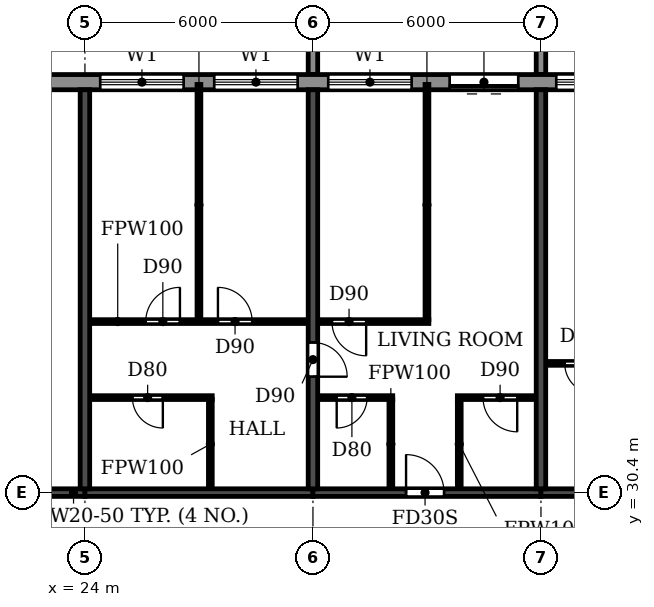
"""IFC4 building model, lengths in metres.
Left out: names, types, materials, properties, quantities, classifications, styles, units other than length and angle.
Written with IfcOpenShell. Run it as: python <this file> out.ifc"""

import sys

from ifc_helpers import new_model, si_unit, direction, frame, frame_2d, origin, place, context, subcontext, project, spatial, polyline, rectangle, outline, extrude, source, transform, mapped, element, fill, save


model = new_model("IFC4")
c1 = context("Model", 3, precision=1e-05, world=origin(), true_north=direction((0.0, 1.0)))
c2 = subcontext(c1, "Body", "Model", "MODEL_VIEW")
j1 = project(units=[si_unit("LENGTHUNIT", "METRE"), si_unit("PLANEANGLEUNIT", "RADIAN")], contexts=[c1])
p1 = place(None, origin())
s1 = spatial("IfcSite", under=j1, at=p1, CompositionType="ELEMENT")
p2 = place(p1, origin())
s2 = spatial("IfcBuilding", under=s1, at=p2, CompositionType="ELEMENT")
p3 = place(p2, frame((0.0, 0.0, 251.1)))
s3 = spatial("IfcBuildingStorey", under=s2, at=p3, CompositionType="ELEMENT", Elevation=251.1)
p4 = place(p3, frame((24.0, 30.5, 0.0), z_axis=(0.0, 0.0, 1.0), x_axis=(0.0, 1.0, 0.0)))
e1 = element("IfcWall", 1, at=p4, inside=s3, PredefinedType="SHEAR", context=c2, shape_type="SweptSolid", body=[
    extrude(rectangle(XDim=10.5, YDim=0.25, at=frame_2d((5.25, 0.0))), origin(), (0.0, 0.0, 1.0), 3.08),
])
p5 = place(p3, frame((30.0, 30.5, 0.0), z_axis=(0.0, 0.0, 1.0), x_axis=(0.0, 1.0, 0.0)))
e2 = element("IfcWall", 2, at=p5, inside=s3, PredefinedType="SHEAR", context=c2, shape_type="SweptSolid", body=[
    extrude(rectangle(XDim=10.5, YDim=0.25, at=frame_2d((5.25, 0.0))), origin(), (0.0, 0.0, 1.0), 3.08),
])
p6 = place(p5, frame((2.95, 0.0, 0.0)))
e3 = element("IfcOpeningElement", 3, at=p6, cuts=e2, PredefinedType="OPENING", context=c2, shape_type="SweptSolid", body=[
    extrude(rectangle(XDim=0.9, YDim=2.1, at=frame_2d((0.45, 1.05))), frame((0.0, 0.135, 0.0), z_axis=(0.0, -1.0, 0.0), x_axis=(1.0, 0.0, 0.0)), (0.0, 0.0, 1.0), 0.27),
])
p7 = place(p3, frame((36.0, 30.5, 0.0), z_axis=(0.0, 0.0, 1.0), x_axis=(0.0, 1.0, 0.0)))
e4 = element("IfcWall", 4, at=p7, inside=s3, PredefinedType="SHEAR", context=c2, shape_type="SweptSolid", body=[
    extrude(rectangle(XDim=10.5, YDim=0.25, at=frame_2d((5.25, 0.0))), origin(), (0.0, 0.0, 1.0), 3.08),
])
p8 = place(p3, frame((18.2, 30.4, 0.0), z_axis=(0.0, 0.0, 1.0), x_axis=(1.0, 0.0, 0.0)))
e5 = element("IfcWall", 5, at=p8, inside=s3, PredefinedType="SHEAR", context=c2, shape_type="SweptSolid", body=[
    extrude(rectangle(XDim=5.8, YDim=0.2, at=frame_2d((2.9, 0.0))), origin(), (0.0, 0.0, 1.0), 2.48),
])
p9 = place(p8, frame((2.3, 0.0, 0.0)))
e6 = element("IfcOpeningElement", 6, at=p9, cuts=e5, PredefinedType="OPENING", context=c2, shape_type="SweptSolid", body=[
    extrude(rectangle(XDim=1.0, YDim=2.1, at=frame_2d((0.5, 1.05))), frame((0.0, 0.11, 0.0), z_axis=(0.0, -1.0, 0.0), x_axis=(1.0, 0.0, 0.0)), (0.0, 0.0, 1.0), 0.22),
])
p10 = place(p3, frame((24.0, 30.4, 0.0), z_axis=(0.0, 0.0, 1.0), x_axis=(1.0, 0.0, 0.0)))
e7 = element("IfcWall", 7, at=p10, inside=s3, PredefinedType="SHEAR", context=c2, shape_type="SweptSolid", body=[
    extrude(rectangle(XDim=6.0, YDim=0.2, at=frame_2d((3.0, 0.0))), origin(), (0.0, 0.0, 1.0), 2.48),
])
p11 = place(p3, frame((30.0, 30.4, 0.0), z_axis=(0.0, 0.0, 1.0), x_axis=(1.0, 0.0, 0.0)))
e8 = element("IfcWall", 8, at=p11, inside=s3, PredefinedType="SHEAR", context=c2, shape_type="SweptSolid", body=[
    extrude(rectangle(XDim=6.0, YDim=0.2, at=frame_2d((3.0, 0.0))), origin(), (0.0, 0.0, 1.0), 2.48),
])
p12 = place(p11, frame((2.45, 0.0, 0.0)))
e9 = element("IfcOpeningElement", 9, at=p12, cuts=e8, PredefinedType="OPENING", context=c2, shape_type="SweptSolid", body=[
    extrude(rectangle(XDim=1.0, YDim=2.1, at=frame_2d((0.5, 1.05))), frame((0.0, 0.11, 0.0), z_axis=(0.0, -1.0, 0.0), x_axis=(1.0, 0.0, 0.0)), (0.0, 0.0, 1.0), 0.22),
])
p13 = place(p3, frame((36.0, 30.4, 0.0), z_axis=(0.0, 0.0, 1.0), x_axis=(1.0, 0.0, 0.0)))
e10 = element("IfcWall", 10, at=p13, inside=s3, PredefinedType="SHEAR", context=c2, shape_type="SweptSolid", body=[
    extrude(rectangle(XDim=6.0, YDim=0.2, at=frame_2d((3.0, 0.0))), origin(), (0.0, 0.0, 1.0), 2.48),
])
p14 = place(p13, frame((2.45, 0.0, 0.0)))
e11 = element("IfcOpeningElement", 11, at=p14, cuts=e10, PredefinedType="OPENING", context=c2, shape_type="SweptSolid", body=[
    extrude(rectangle(XDim=1.0, YDim=2.1, at=frame_2d((0.5, 1.05))), frame((0.0, 0.11, 0.0), z_axis=(0.0, -1.0, 0.0), x_axis=(1.0, 0.0, 0.0)), (0.0, 0.0, 1.0), 0.22),
])
p15 = place(p3, frame((79.317, 41.2, 0.0), z_axis=(0.0, 0.0, 1.0), x_axis=(-1.0, 0.0, 0.0)))
e12 = element("IfcWall", 12, at=p15, inside=s3, PredefinedType="STANDARD", context=c2, shape_type="SweptSolid", body=[
    extrude(rectangle(XDim=56.634, YDim=0.4, at=frame_2d((28.317, 0.0))), origin(), (0.0, 0.0, 1.0), 3.08),
])
p16 = place(p15, frame((52.717, 0.0, 0.9)))
e13 = element("IfcOpeningElement", 13, at=p16, cuts=e12, PredefinedType="OPENING", context=c2, shape_type="SweptSolid", body=[
    extrude(rectangle(XDim=2.2, YDim=1.5, at=frame_2d((1.1, 0.75))), frame((0.0, 0.21, 0.0), z_axis=(0.0, -1.0, 0.0), x_axis=(1.0, 0.0, 0.0)), (0.0, 0.0, 1.0), 0.42),
])
p17 = place(p15, frame((49.717, 0.0, 0.9)))
e14 = element("IfcOpeningElement", 14, at=p17, cuts=e12, PredefinedType="OPENING", context=c2, shape_type="SweptSolid", body=[
    extrude(rectangle(XDim=2.2, YDim=1.5, at=frame_2d((1.1, 0.75))), frame((0.0, 0.21, 0.0), z_axis=(0.0, -1.0, 0.0), x_axis=(1.0, 0.0, 0.0)), (0.0, 0.0, 1.0), 0.42),
])
p18 = place(p15, frame((46.717, 0.0, 0.9)))
e15 = element("IfcOpeningElement", 15, at=p18, cuts=e12, PredefinedType="OPENING", context=c2, shape_type="SweptSolid", body=[
    extrude(rectangle(XDim=2.2, YDim=1.5, at=frame_2d((1.1, 0.75))), frame((0.0, 0.21, 0.0), z_axis=(0.0, -1.0, 0.0), x_axis=(1.0, 0.0, 0.0)), (0.0, 0.0, 1.0), 0.42),
])
p19 = place(p15, frame((43.917, 0.0, 0.0)))
e16 = element("IfcOpeningElement", 16, at=p19, cuts=e12, PredefinedType="OPENING", context=c2, shape_type="SweptSolid", body=[
    extrude(rectangle(XDim=1.8, YDim=2.4, at=frame_2d((0.9, 1.2))), frame((0.0, 0.21, 0.0), z_axis=(0.0, -1.0, 0.0), x_axis=(1.0, 0.0, 0.0)), (0.0, 0.0, 1.0), 0.42),
])
p20 = place(p15, frame((40.717, 0.0, 0.9)))
e17 = element("IfcOpeningElement", 17, at=p20, cuts=e12, PredefinedType="OPENING", context=c2, shape_type="SweptSolid", body=[
    extrude(rectangle(XDim=2.2, YDim=1.5, at=frame_2d((1.1, 0.75))), frame((0.0, 0.21, 0.0), z_axis=(0.0, -1.0, 0.0), x_axis=(1.0, 0.0, 0.0)), (0.0, 0.0, 1.0), 0.42),
])
p21 = place(p15, frame((37.917, 0.0, 0.0)))
e18 = element("IfcOpeningElement", 18, at=p21, cuts=e12, PredefinedType="OPENING", context=c2, shape_type="SweptSolid", body=[
    extrude(rectangle(XDim=1.8, YDim=2.4, at=frame_2d((0.9, 1.2))), frame((0.0, 0.21, 0.0), z_axis=(0.0, -1.0, 0.0), x_axis=(1.0, 0.0, 0.0)), (0.0, 0.0, 1.0), 0.42),
])
p22 = place(p15, frame((34.717, 0.0, 0.9)))
e19 = element("IfcOpeningElement", 19, at=p22, cuts=e12, PredefinedType="OPENING", context=c2, shape_type="SweptSolid", body=[
    extrude(rectangle(XDim=2.2, YDim=1.5, at=frame_2d((1.1, 0.75))), frame((0.0, 0.21, 0.0), z_axis=(0.0, -1.0, 0.0), x_axis=(1.0, 0.0, 0.0)), (0.0, 0.0, 1.0), 0.42),
])
p23 = place(p15, frame((31.717, 0.0, 0.9)))
e20 = element("IfcOpeningElement", 20, at=p23, cuts=e12, PredefinedType="OPENING", context=c2, shape_type="SweptSolid", body=[
    extrude(rectangle(XDim=2.2, YDim=1.5, at=frame_2d((1.1, 0.75))), frame((0.0, 0.21, 0.0), z_axis=(0.0, -1.0, 0.0), x_axis=(1.0, 0.0, 0.0)), (0.0, 0.0, 1.0), 0.42),
])
p24 = place(p15, frame((28.717, 0.0, 0.9)))
e21 = element("IfcOpeningElement", 21, at=p24, cuts=e12, PredefinedType="OPENING", context=c2, shape_type="SweptSolid", body=[
    extrude(rectangle(XDim=2.2, YDim=1.5, at=frame_2d((1.1, 0.75))), frame((0.0, 0.21, 0.0), z_axis=(0.0, -1.0, 0.0), x_axis=(1.0, 0.0, 0.0)), (0.0, 0.0, 1.0), 0.42),
])
p25 = place(p15, frame((25.917, 0.0, 0.0)))
e22 = element("IfcOpeningElement", 22, at=p25, cuts=e12, PredefinedType="OPENING", context=c2, shape_type="SweptSolid", body=[
    extrude(rectangle(XDim=1.8, YDim=2.4, at=frame_2d((0.9, 1.2))), frame((0.0, 0.21, 0.0), z_axis=(0.0, -1.0, 0.0), x_axis=(1.0, 0.0, 0.0)), (0.0, 0.0, 1.0), 0.42),
])
p26 = place(p15, frame((22.917, 0.0, 0.0)))
e23 = element("IfcOpeningElement", 23, at=p26, cuts=e12, PredefinedType="OPENING", context=c2, shape_type="SweptSolid", body=[
    extrude(rectangle(XDim=1.8, YDim=2.4, at=frame_2d((0.9, 1.2))), frame((0.0, 0.21, 0.0), z_axis=(0.0, -1.0, 0.0), x_axis=(1.0, 0.0, 0.0)), (0.0, 0.0, 1.0), 0.42),
])
p27 = place(p15, frame((19.717, 0.0, 0.9)))
e24 = element("IfcOpeningElement", 24, at=p27, cuts=e12, PredefinedType="OPENING", context=c2, shape_type="SweptSolid", body=[
    extrude(rectangle(XDim=2.2, YDim=1.5, at=frame_2d((1.1, 0.75))), frame((0.0, 0.21, 0.0), z_axis=(0.0, -1.0, 0.0), x_axis=(1.0, 0.0, 0.0)), (0.0, 0.0, 1.0), 0.42),
])
p28 = place(p15, frame((16.717, 0.0, 0.9)))
e25 = element("IfcOpeningElement", 25, at=p28, cuts=e12, PredefinedType="OPENING", context=c2, shape_type="SweptSolid", body=[
    extrude(rectangle(XDim=2.2, YDim=1.5, at=frame_2d((1.1, 0.75))), frame((0.0, 0.21, 0.0), z_axis=(0.0, -1.0, 0.0), x_axis=(1.0, 0.0, 0.0)), (0.0, 0.0, 1.0), 0.42),
])
p29 = place(p15, frame((13.717, 0.0, 0.9)))
e26 = element("IfcOpeningElement", 26, at=p29, cuts=e12, PredefinedType="OPENING", context=c2, shape_type="SweptSolid", body=[
    extrude(rectangle(XDim=2.2, YDim=1.5, at=frame_2d((1.1, 0.75))), frame((0.0, 0.21, 0.0), z_axis=(0.0, -1.0, 0.0), x_axis=(1.0, 0.0, 0.0)), (0.0, 0.0, 1.0), 0.42),
])
p30 = place(p15, frame((10.717, 0.0, 0.9)))
e27 = element("IfcOpeningElement", 27, at=p30, cuts=e12, PredefinedType="OPENING", context=c2, shape_type="SweptSolid", body=[
    extrude(rectangle(XDim=2.2, YDim=1.5, at=frame_2d((1.1, 0.75))), frame((0.0, 0.21, 0.0), z_axis=(0.0, -1.0, 0.0), x_axis=(1.0, 0.0, 0.0)), (0.0, 0.0, 1.0), 0.42),
])
p31 = place(p15, frame((7.917, 0.0, 0.0)))
e28 = element("IfcOpeningElement", 28, at=p31, cuts=e12, PredefinedType="OPENING", context=c2, shape_type="SweptSolid", body=[
    extrude(rectangle(XDim=1.8, YDim=2.4, at=frame_2d((0.9, 1.2))), frame((0.0, 0.21, 0.0), z_axis=(0.0, -1.0, 0.0), x_axis=(1.0, 0.0, 0.0)), (0.0, 0.0, 1.0), 0.42),
])
p32 = place(p15, frame((4.717, 0.0, 0.9)))
e29 = element("IfcOpeningElement", 29, at=p32, cuts=e12, PredefinedType="OPENING", context=c2, shape_type="SweptSolid", body=[
    extrude(rectangle(XDim=2.2, YDim=1.5, at=frame_2d((1.1, 0.75))), frame((0.0, 0.21, 0.0), z_axis=(0.0, -1.0, 0.0), x_axis=(1.0, 0.0, 0.0)), (0.0, 0.0, 1.0), 0.42),
])
p33 = place(p15, frame((1.917, 0.0, 0.0)))
e30 = element("IfcOpeningElement", 30, at=p33, cuts=e12, PredefinedType="OPENING", context=c2, shape_type="SweptSolid", body=[
    extrude(rectangle(XDim=1.8, YDim=2.4, at=frame_2d((0.9, 1.2))), frame((0.0, 0.21, 0.0), z_axis=(0.0, -1.0, 0.0), x_axis=(1.0, 0.0, 0.0)), (0.0, 0.0, 1.0), 0.42),
])
m1 = source(origin(), c2, "Body", "SweptSolid", [
    extrude(outline(polyline([(0.0, 0.0), (0.25, 0.0), (0.25, 3.1), (0.0, 3.1), (0.0, 0.0)])), origin(), (0.0, 0.0, 1.0), 3.1),
])
for number, where in (
    (31, (29.875, 41.4, 0.0)),
    (32, (35.875, 41.4, 0.0)),
):
    element("IfcWall", number, at=place(p3, frame(where)), inside=s3, PredefinedType="STANDARD", context=c2, shape_type="MappedRepresentation", body=[
        mapped(m1, transform((0.0, 0.0, 0.0))),
    ])
p34 = place(p3, frame((24.135, 32.9, 0.0), z_axis=(0.0, 0.0, 1.0), x_axis=(1.0, 0.0, 0.0)))
e33 = element("IfcWall", 33, at=p34, inside=s3, PredefinedType="PARTITIONING", context=c2, shape_type="SweptSolid", body=[
    extrude(rectangle(XDim=3.215, YDim=0.1, at=frame_2d((1.607, 0.0))), origin(), (0.0, 0.0, 1.0), 3.08),
])
p35 = place(p34, frame((1.115, 0.0, 0.0)))
e34 = element("IfcOpeningElement", 34, at=p35, cuts=e33, PredefinedType="OPENING", context=c2, shape_type="SweptSolid", body=[
    extrude(rectangle(XDim=0.8, YDim=2.1, at=frame_2d((0.4, 1.05))), frame((0.0, 0.06, 0.0), z_axis=(0.0, -1.0, 0.0), x_axis=(1.0, 0.0, 0.0)), (0.0, 0.0, 1.0), 0.12),
])
p36 = place(p3, frame((30.135, 32.9, 0.0), z_axis=(0.0, 0.0, 1.0), x_axis=(1.0, 0.0, 0.0)))
e35 = element("IfcWall", 35, at=p36, inside=s3, PredefinedType="PARTITIONING", context=c2, shape_type="SweptSolid", body=[
    extrude(rectangle(XDim=1.965, YDim=0.1, at=frame_2d((0.982, 0.0))), origin(), (0.0, 0.0, 1.0), 3.08),
])
p37 = place(p36, frame((0.49, 0.0, 0.0)))
e36 = element("IfcOpeningElement", 36, at=p37, cuts=e35, PredefinedType="OPENING", context=c2, shape_type="SweptSolid", body=[
    extrude(rectangle(XDim=0.8, YDim=2.1, at=frame_2d((0.4, 1.05))), frame((0.0, 0.06, 0.0), z_axis=(0.0, -1.0, 0.0), x_axis=(1.0, 0.0, 0.0)), (0.0, 0.0, 1.0), 0.12),
])
p38 = place(p3, frame((33.8, 32.9, 0.0), z_axis=(0.0, 0.0, 1.0), x_axis=(1.0, 0.0, 0.0)))
e37 = element("IfcWall", 37, at=p38, inside=s3, PredefinedType="PARTITIONING", context=c2, shape_type="SweptSolid", body=[
    extrude(rectangle(XDim=2.065, YDim=0.1, at=frame_2d((1.032, 0.0))), origin(), (0.0, 0.0, 1.0), 3.08),
])
p39 = place(p38, frame((0.675, 0.0, 0.0)))
e38 = element("IfcOpeningElement", 38, at=p39, cuts=e37, PredefinedType="OPENING", context=c2, shape_type="SweptSolid", body=[
    extrude(rectangle(XDim=0.9, YDim=2.1, at=frame_2d((0.45, 1.05))), frame((0.0, 0.06, 0.0), z_axis=(0.0, -1.0, 0.0), x_axis=(1.0, 0.0, 0.0)), (0.0, 0.0, 1.0), 0.12),
])
p40 = place(p3, frame((36.135, 33.8, 0.0), z_axis=(0.0, 0.0, 1.0), x_axis=(1.0, 0.0, 0.0)))
e39 = element("IfcWall", 39, at=p40, inside=s3, PredefinedType="PARTITIONING", context=c2, shape_type="SweptSolid", body=[
    extrude(rectangle(XDim=1.965, YDim=0.1, at=frame_2d((0.982, 0.0))), origin(), (0.0, 0.0, 1.0), 3.08),
])
p41 = place(p40, frame((0.49, 0.0, 0.0)))
e40 = element("IfcOpeningElement", 40, at=p41, cuts=e39, PredefinedType="OPENING", context=c2, shape_type="SweptSolid", body=[
    extrude(rectangle(XDim=0.8, YDim=2.1, at=frame_2d((0.4, 1.05))), frame((0.0, 0.06, 0.0), z_axis=(0.0, -1.0, 0.0), x_axis=(1.0, 0.0, 0.0)), (0.0, 0.0, 1.0), 0.12),
])
p42 = place(p3, frame((24.135, 34.9, 0.0), z_axis=(0.0, 0.0, 1.0), x_axis=(1.0, 0.0, 0.0)))
e41 = element("IfcWall", 41, at=p42, inside=s3, PredefinedType="PARTITIONING", context=c2, shape_type="SweptSolid", body=[
    extrude(rectangle(XDim=5.73, YDim=0.1, at=frame_2d((2.865, 0.0))), origin(), (0.0, 0.0, 1.0), 3.08),
])
p43 = place(p42, frame((1.465, 0.0, 0.0)))
e42 = element("IfcOpeningElement", 42, at=p43, cuts=e41, PredefinedType="OPENING", context=c2, shape_type="SweptSolid", body=[
    extrude(rectangle(XDim=0.9, YDim=2.1, at=frame_2d((0.45, 1.05))), frame((0.0, 0.06, 0.0), z_axis=(0.0, -1.0, 0.0), x_axis=(1.0, 0.0, 0.0)), (0.0, 0.0, 1.0), 0.12),
])
p44 = place(p42, frame((3.365, 0.0, 0.0)))
e43 = element("IfcOpeningElement", 43, at=p44, cuts=e41, PredefinedType="OPENING", context=c2, shape_type="SweptSolid", body=[
    extrude(rectangle(XDim=0.9, YDim=2.1, at=frame_2d((0.45, 1.05))), frame((0.0, 0.06, 0.0), z_axis=(0.0, -1.0, 0.0), x_axis=(1.0, 0.0, 0.0)), (0.0, 0.0, 1.0), 0.12),
])
p45 = place(p3, frame((30.135, 34.9, 0.0), z_axis=(0.0, 0.0, 1.0), x_axis=(1.0, 0.0, 0.0)))
e44 = element("IfcWall", 44, at=p45, inside=s3, PredefinedType="PARTITIONING", context=c2, shape_type="SweptSolid", body=[
    extrude(rectangle(XDim=2.915, YDim=0.1, at=frame_2d((1.458, 0.0))), origin(), (0.0, 0.0, 1.0), 3.08),
])
p46 = place(p45, frame((0.365, 0.0, 0.0)))
e45 = element("IfcOpeningElement", 45, at=p46, cuts=e44, PredefinedType="OPENING", context=c2, shape_type="SweptSolid", body=[
    extrude(rectangle(XDim=0.9, YDim=2.1, at=frame_2d((0.45, 1.05))), frame((0.0, 0.06, 0.0), z_axis=(0.0, -1.0, 0.0), x_axis=(1.0, 0.0, 0.0)), (0.0, 0.0, 1.0), 0.12),
])
p47 = place(p3, frame((27.0, 34.95, 0.0), z_axis=(0.0, 0.0, 1.0), x_axis=(0.0, 1.0, 0.0)))
e46 = element("IfcWall", 46, at=p47, inside=s3, PredefinedType="PARTITIONING", context=c2, shape_type="SweptSolid", body=[
    extrude(rectangle(XDim=6.19, YDim=0.1, at=frame_2d((3.095, 0.0))), origin(), (0.0, 0.0, 1.0), 3.08),
])
for number, where, z_axis, x_axis in (
    (47, (27.3, 30.51, 0.0), (0.0, 0.0, 1.0), (0.0, 1.0, 0.0)),
    (48, (32.05, 30.51, 0.0), (0.0, 0.0, 1.0), (0.0, 1.0, 0.0)),
):
    element("IfcWall", number, at=place(p3, frame(where, z_axis=z_axis, x_axis=x_axis)), inside=s3, PredefinedType="PARTITIONING", context=c2, shape_type="SweptSolid", body=[
        extrude(rectangle(XDim=2.34, YDim=0.1, at=frame_2d((1.17, 0.0))), origin(), (0.0, 0.0, 1.0), 3.08),
    ])
p48 = place(p3, frame((33.0, 34.95, 0.0), z_axis=(0.0, 0.0, 1.0), x_axis=(0.0, 1.0, 0.0)))
e49 = element("IfcWall", 49, at=p48, inside=s3, PredefinedType="PARTITIONING", context=c2, shape_type="SweptSolid", body=[
    extrude(rectangle(XDim=6.19, YDim=0.1, at=frame_2d((3.095, 0.0))), origin(), (0.0, 0.0, 1.0), 3.08),
])
p49 = place(p3, frame((33.85, 30.51, 0.0), z_axis=(0.0, 0.0, 1.0), x_axis=(0.0, 1.0, 0.0)))
e50 = element("IfcWall", 50, at=p49, inside=s3, PredefinedType="PARTITIONING", context=c2, shape_type="SweptSolid", body=[
    extrude(rectangle(XDim=2.34, YDim=0.1, at=frame_2d((1.17, 0.0))), origin(), (0.0, 0.0, 1.0), 3.08),
])
p50 = place(p16, origin())
e51 = element("IfcWindow", 51, at=p50, inside=s3, PartitioningType="DOUBLE_PANEL_HORIZONTAL", PredefinedType="WINDOW", context=c2, shape_type="SweptSolid", body=[
    extrude(rectangle(XDim=2.2, YDim=1.5, at=frame_2d((1.1, 0.75))), frame((0.0, 0.03, 0.0), z_axis=(0.0, -1.0, 0.0), x_axis=(1.0, 0.0, 0.0)), (0.0, 0.0, 1.0), 0.06),
])
fill(e13, e51)
p51 = place(p17, origin())
e52 = element("IfcWindow", 52, at=p51, inside=s3, PartitioningType="DOUBLE_PANEL_HORIZONTAL", PredefinedType="WINDOW", context=c2, shape_type="SweptSolid", body=[
    extrude(rectangle(XDim=2.2, YDim=1.5, at=frame_2d((1.1, 0.75))), frame((0.0, 0.03, 0.0), z_axis=(0.0, -1.0, 0.0), x_axis=(1.0, 0.0, 0.0)), (0.0, 0.0, 1.0), 0.06),
])
fill(e14, e52)
p52 = place(p18, origin())
e53 = element("IfcWindow", 53, at=p52, inside=s3, PartitioningType="DOUBLE_PANEL_HORIZONTAL", PredefinedType="WINDOW", context=c2, shape_type="SweptSolid", body=[
    extrude(rectangle(XDim=2.2, YDim=1.5, at=frame_2d((1.1, 0.75))), frame((0.0, 0.03, 0.0), z_axis=(0.0, -1.0, 0.0), x_axis=(1.0, 0.0, 0.0)), (0.0, 0.0, 1.0), 0.06),
])
fill(e15, e53)
p53 = place(p19, origin())
e54 = element("IfcDoor", 54, at=p53, inside=s3, OperationType="DOUBLE_DOOR_SLIDING", PredefinedType="DOOR", context=c2, shape_type="SweptSolid", body=[
    extrude(rectangle(XDim=1.8, YDim=2.4, at=frame_2d((0.9, 1.2))), frame((0.0, 0.025, 0.0), z_axis=(0.0, -1.0, 0.0), x_axis=(1.0, 0.0, 0.0)), (0.0, 0.0, 1.0), 0.05),
])
fill(e16, e54)
p54 = place(p20, origin())
e55 = element("IfcWindow", 55, at=p54, inside=s3, PartitioningType="DOUBLE_PANEL_HORIZONTAL", PredefinedType="WINDOW", context=c2, shape_type="SweptSolid", body=[
    extrude(rectangle(XDim=2.2, YDim=1.5, at=frame_2d((1.1, 0.75))), frame((0.0, 0.03, 0.0), z_axis=(0.0, -1.0, 0.0), x_axis=(1.0, 0.0, 0.0)), (0.0, 0.0, 1.0), 0.06),
])
fill(e17, e55)
p55 = place(p35, frame((0.8, 0.0, 0.0), z_axis=(0.0, 0.0, 1.0), x_axis=(-1.0, 0.0, 0.0)))
e56 = element("IfcDoor", 56, at=p55, inside=s3, OperationType="SINGLE_SWING_LEFT", PredefinedType="DOOR", context=c2, shape_type="SweptSolid", body=[
    extrude(rectangle(XDim=0.8, YDim=2.1, at=frame_2d((0.4, 1.05))), frame((0.0, 0.025, 0.0), z_axis=(0.0, -1.0, 0.0), x_axis=(1.0, 0.0, 0.0)), (0.0, 0.0, 1.0), 0.05),
])
fill(e34, e56)
p56 = place(p43, origin())
e57 = element("IfcDoor", 57, at=p56, inside=s3, OperationType="SINGLE_SWING_RIGHT", PredefinedType="DOOR", context=c2, shape_type="SweptSolid", body=[
    extrude(rectangle(XDim=0.9, YDim=2.1, at=frame_2d((0.45, 1.05))), frame((0.0, 0.025, 0.0), z_axis=(0.0, -1.0, 0.0), x_axis=(1.0, 0.0, 0.0)), (0.0, 0.0, 1.0), 0.05),
])
fill(e42, e57)
p57 = place(p44, origin())
e58 = element("IfcDoor", 58, at=p57, inside=s3, OperationType="SINGLE_SWING_LEFT", PredefinedType="DOOR", context=c2, shape_type="SweptSolid", body=[
    extrude(rectangle(XDim=0.9, YDim=2.1, at=frame_2d((0.45, 1.05))), frame((0.0, 0.025, 0.0), z_axis=(0.0, -1.0, 0.0), x_axis=(1.0, 0.0, 0.0)), (0.0, 0.0, 1.0), 0.05),
])
fill(e43, e58)
p58 = place(p6, frame((0.9, 0.0, 0.0), z_axis=(0.0, 0.0, 1.0), x_axis=(-1.0, 0.0, 0.0)))
e59 = element("IfcDoor", 59, at=p58, inside=s3, OperationType="SINGLE_SWING_RIGHT", PredefinedType="DOOR", context=c2, shape_type="SweptSolid", body=[
    extrude(rectangle(XDim=0.9, YDim=2.1, at=frame_2d((0.45, 1.05))), frame((0.0, 0.025, 0.0), z_axis=(0.0, -1.0, 0.0), x_axis=(1.0, 0.0, 0.0)), (0.0, 0.0, 1.0), 0.05),
])
fill(e3, e59)
p59 = place(p46, frame((0.9, 0.0, 0.0), z_axis=(0.0, 0.0, 1.0), x_axis=(-1.0, 0.0, 0.0)))
e60 = element("IfcDoor", 60, at=p59, inside=s3, OperationType="SINGLE_SWING_LEFT", PredefinedType="DOOR", context=c2, shape_type="SweptSolid", body=[
    extrude(rectangle(XDim=0.9, YDim=2.1, at=frame_2d((0.45, 1.05))), frame((0.0, 0.025, 0.0), z_axis=(0.0, -1.0, 0.0), x_axis=(1.0, 0.0, 0.0)), (0.0, 0.0, 1.0), 0.05),
])
fill(e45, e60)
p60 = place(p37, frame((0.8, 0.0, 0.0), z_axis=(0.0, 0.0, 1.0), x_axis=(-1.0, 0.0, 0.0)))
e61 = element("IfcDoor", 61, at=p60, inside=s3, OperationType="SINGLE_SWING_RIGHT", PredefinedType="DOOR", context=c2, shape_type="SweptSolid", body=[
    extrude(rectangle(XDim=0.8, YDim=2.1, at=frame_2d((0.4, 1.05))), frame((0.0, 0.025, 0.0), z_axis=(0.0, -1.0, 0.0), x_axis=(1.0, 0.0, 0.0)), (0.0, 0.0, 1.0), 0.05),
])
fill(e36, e61)
p61 = place(p12, origin())
e62 = element("IfcDoor", 62, at=p61, inside=s3, OperationType="SINGLE_SWING_LEFT", PredefinedType="DOOR", context=c2, shape_type="SweptSolid", body=[
    extrude(rectangle(XDim=1.0, YDim=2.1, at=frame_2d((0.5, 1.05))), frame((0.0, 0.025, 0.0), z_axis=(0.0, -1.0, 0.0), x_axis=(1.0, 0.0, 0.0)), (0.0, 0.0, 1.0), 0.05),
])
fill(e9, e62)
p62 = place(p39, frame((0.9, 0.0, 0.0), z_axis=(0.0, 0.0, 1.0), x_axis=(-1.0, 0.0, 0.0)))
e63 = element("IfcDoor", 63, at=p62, inside=s3, OperationType="SINGLE_SWING_LEFT", PredefinedType="DOOR", context=c2, shape_type="SweptSolid", body=[
    extrude(rectangle(XDim=0.9, YDim=2.1, at=frame_2d((0.45, 1.05))), frame((0.0, 0.025, 0.0), z_axis=(0.0, -1.0, 0.0), x_axis=(1.0, 0.0, 0.0)), (0.0, 0.0, 1.0), 0.05),
])
fill(e38, e63)
p63 = place(p41, frame((0.8, 0.0, 0.0), z_axis=(0.0, 0.0, 1.0), x_axis=(-1.0, 0.0, 0.0)))
e64 = element("IfcDoor", 64, at=p63, inside=s3, OperationType="SINGLE_SWING_LEFT", PredefinedType="DOOR", context=c2, shape_type="SweptSolid", body=[
    extrude(rectangle(XDim=0.8, YDim=2.1, at=frame_2d((0.4, 1.05))), frame((0.0, 0.025, 0.0), z_axis=(0.0, -1.0, 0.0), x_axis=(1.0, 0.0, 0.0)), (0.0, 0.0, 1.0), 0.05),
])
fill(e40, e64)
save(model, sys.argv[1])
